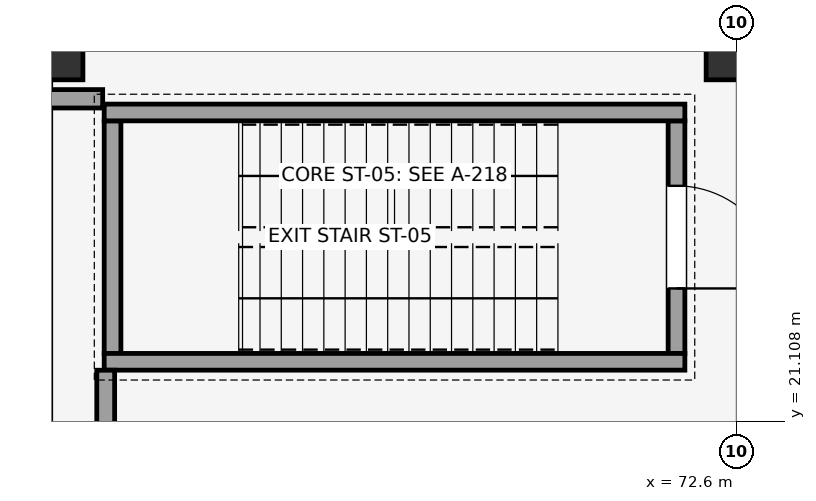
"""IFC4 building model, lengths in metres.
Left out: names, types, materials, properties, quantities, classifications, styles, units other than length and angle.
Written with IfcOpenShell. Run it as: python <this file> out.ifc"""

import sys

from ifc_helpers import new_model, si_unit, direction, frame, frame_2d, origin, origin_2d, place, context, subcontext, project, spatial, rectangle, extrude, element, fill, save


model = new_model("IFC4")
c1 = context("Model", 3, precision=1e-05, world=origin(), true_north=direction((0.0, 1.0)))
c2 = subcontext(c1, "Body", "Model", "MODEL_VIEW")
j1 = project(units=[si_unit("LENGTHUNIT", "METRE"), si_unit("PLANEANGLEUNIT", "RADIAN")], contexts=[c1])
p1 = place(None, origin())
s1 = spatial("IfcSite", under=j1, at=p1, CompositionType="ELEMENT")
p2 = place(p1, origin())
s2 = spatial("IfcBuilding", under=s1, at=p2, CompositionType="ELEMENT")
p3 = place(p2, frame((0.0, 0.0, -4.8)))
s3 = spatial("IfcBuildingStorey", under=s2, at=p3, CompositionType="ELEMENT", Elevation=-4.8)
for number, where, z_axis, x_axis in (
    (1, (63.6, 26.0, 0.0), (0.0, 0.0, 1.0), (1.0, 0.0, 0.0)),
    (2, (72.6, 26.0, 0.0), (0.0, 0.0, 1.0), (1.0, 0.0, 0.0)),
):
    element("IfcColumn", number, at=place(p3, frame(where, z_axis=z_axis, x_axis=x_axis)), inside=s3, PredefinedType="COLUMN", context=c2, shape_type="SweptSolid", body=[
        extrude(rectangle(XDim=0.8, YDim=0.8, at=origin_2d()), origin(), (0.0, 0.0, 1.0), 4.8),
    ])
p4 = place(p3, frame((71.81, 25.06, 0.0), z_axis=(0.0, 0.0, 1.0), x_axis=(0.0, -1.0, 0.0)))
e3 = element("IfcWall", 3, at=p4, inside=s3, PredefinedType="SHEAR", context=c2, shape_type="SweptSolid", body=[
    extrude(rectangle(XDim=3.06, YDim=0.22, at=frame_2d((1.53, 0.0))), origin(), (0.0, 0.0, 1.0), 4.8),
])
p5 = place(p4, frame((0.855, 0.0, 0.0)))
e4 = element("IfcOpeningElement", 4, at=p5, cuts=e3, PredefinedType="OPENING", context=c2, shape_type="SweptSolid", body=[
    extrude(rectangle(XDim=1.35, YDim=2.15, at=frame_2d((0.675, 1.075))), frame((0.0, 0.12, 0.0), z_axis=(0.0, -1.0, 0.0), x_axis=(1.0, 0.0, 0.0)), (0.0, 0.0, 1.0), 0.24),
])
p6 = place(p3, frame((64.39, 25.06, 0.0), z_axis=(0.0, 0.0, 1.0), x_axis=(0.0, -1.0, 0.0)))
e5 = element("IfcWall", 5, at=p6, inside=s3, PredefinedType="SHEAR", context=c2, shape_type="SweptSolid", body=[
    extrude(rectangle(XDim=3.06, YDim=0.22, at=frame_2d((1.53, 0.0))), origin(), (0.0, 0.0, 1.0), 4.8),
])
for number, where, z_axis, x_axis in (
    (6, (71.92, 25.17, 0.0), (0.0, 0.0, 1.0), (-1.0, 0.0, 0.0)),
    (7, (71.92, 21.89, 0.0), (0.0, 0.0, 1.0), (-1.0, 0.0, 0.0)),
):
    element("IfcWall", number, at=place(p3, frame(where, z_axis=z_axis, x_axis=x_axis)), inside=s3, PredefinedType="SHEAR", context=c2, shape_type="SweptSolid", body=[
        extrude(rectangle(XDim=7.64, YDim=0.22, at=frame_2d((3.82, 0.0))), origin(), (0.0, 0.0, 1.0), 4.8),
    ])
p7 = place(p3, frame((61.401, 25.35, 0.0), z_axis=(0.0, 0.0, 1.0), x_axis=(1.0, 0.0, 0.0)))
e8 = element("IfcWall", 8, at=p7, inside=s3, PredefinedType="SOLIDWALL", context=c2, shape_type="SweptSolid", body=[
    extrude(rectangle(XDim=2.859, YDim=0.242, at=frame_2d((1.43, 0.0))), origin(), (0.0, 0.0, 1.0), 2.7),
])
p8 = place(p3, frame((64.3, 21.779, 0.0), z_axis=(0.0, 0.0, 1.0), x_axis=(0.0, -1.0, 0.0)))
e9 = element("IfcWall", 9, at=p8, inside=s3, PredefinedType="PARTITIONING", context=c2, shape_type="SweptSolid", body=[
    extrude(rectangle(XDim=3.573, YDim=0.235, at=frame_2d((1.787, 0.0))), origin(), (0.0, 0.0, 1.0), 2.7),
])
p9 = place(p5, origin())
e10 = element("IfcDoor", 10, at=p9, inside=s3, OperationType="SINGLE_SWING_RIGHT", PredefinedType="DOOR", context=c2, shape_type="SweptSolid", body=[
    extrude(rectangle(XDim=1.35, YDim=2.15, at=frame_2d((0.675, 1.075))), frame((0.0, 0.025, 0.0), z_axis=(0.0, -1.0, 0.0), x_axis=(1.0, 0.0, 0.0)), (0.0, 0.0, 1.0), 0.05),
])
fill(e4, e10)
save(model, sys.argv[1])
